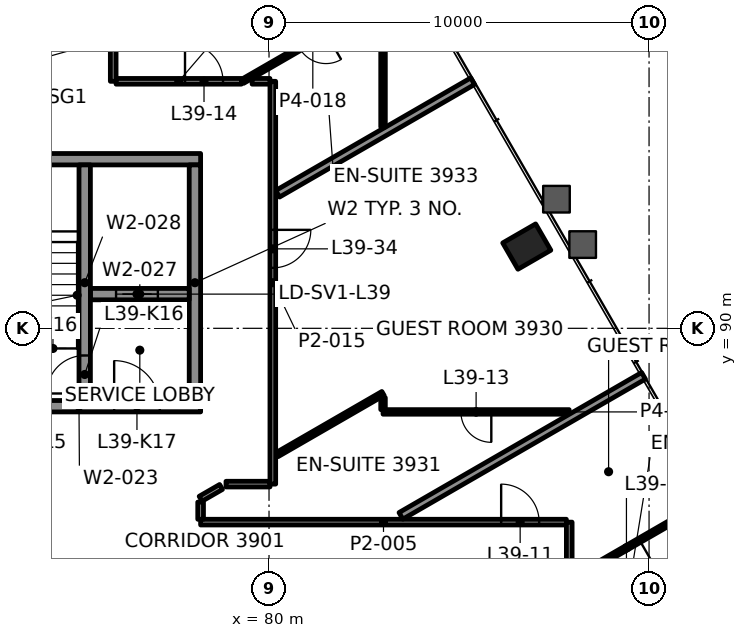
"""IFC4 building model, lengths in metres.
Left out: names, types, materials, properties, quantities, classifications, styles, units other than length and angle.
Written with IfcOpenShell. Run it as: python <this file> out.ifc"""

import sys

from ifc_helpers import new_model, si_unit, direction, frame, frame_2d, origin, origin_2d, place, context, subcontext, project, spatial, rectangle, hollow_rectangle, extrude, element, fill, save


model = new_model("IFC4")
c1 = context("Model", 3, precision=1e-05, world=origin(), true_north=direction((0.0, 1.0)))
c2 = subcontext(c1, "Body", "Model", "MODEL_VIEW")
j1 = project(units=[si_unit("LENGTHUNIT", "METRE"), si_unit("PLANEANGLEUNIT", "RADIAN")], contexts=[c1])
p1 = place(None, origin())
s1 = spatial("IfcSite", under=j1, at=p1, CompositionType="ELEMENT")
p2 = place(p1, origin())
s2 = spatial("IfcBuilding", under=s1, at=p2, CompositionType="ELEMENT")
p3 = place(p2, frame((0.0, 0.0, 171.4)))
s3 = spatial("IfcBuildingStorey", under=s2, at=p3, CompositionType="ELEMENT", Elevation=171.4)
p4 = place(p3, frame((86.782, 92.151, -0.0), z_axis=(0.0, 0.0, 1.0), x_axis=(-0.5, 0.866025403784, 0.0)))
e1 = element("IfcColumn", 1, at=p4, inside=s3, PredefinedType="COLUMN", context=c2, shape_type="SweptSolid", body=[
    extrude(hollow_rectangle(XDim=0.8, YDim=1.0, WallThickness=0.05, at=origin_2d()), origin(), (0.0, 0.0, 1.0), 3.9),
])
p5 = place(p3, frame((71.8, 87.95, 0.0), z_axis=(0.0, 0.0, 1.0), x_axis=(1.0, 0.0, 0.0)))
e2 = element("IfcWall", 2, at=p5, inside=s3, PredefinedType="SHEAR", context=c2, shape_type="SweptSolid", body=[
    extrude(rectangle(XDim=6.4, YDim=0.3, at=frame_2d((3.2, 0.0))), origin(), (0.0, 0.0, 1.0), 3.7),
])
p6 = place(p5, frame((1.325, 0.0, 0.0)))
e3 = element("IfcOpeningElement", 3, at=p6, cuts=e2, PredefinedType="OPENING", context=c2, shape_type="SweptSolid", body=[
    extrude(rectangle(XDim=1.0, YDim=2.1, at=frame_2d((0.5, 1.05))), frame((0.0, 0.16, 0.0), z_axis=(0.0, -1.0, 0.0), x_axis=(1.0, 0.0, 0.0)), (0.0, 0.0, 1.0), 0.32),
])
p7 = place(p5, frame((4.125, 0.0, 0.0)))
e4 = element("IfcOpeningElement", 4, at=p7, cuts=e2, PredefinedType="OPENING", context=c2, shape_type="SweptSolid", body=[
    extrude(rectangle(XDim=1.2, YDim=2.1, at=frame_2d((0.6, 1.05))), frame((0.0, 0.16, 0.0), z_axis=(0.0, -1.0, 0.0), x_axis=(1.0, 0.0, 0.0)), (0.0, 0.0, 1.0), 0.32),
])
p8 = place(p3, frame((71.8, 94.45, 0.0), z_axis=(0.0, 0.0, 1.0), x_axis=(1.0, 0.0, 0.0)))
e5 = element("IfcWall", 5, at=p8, inside=s3, PredefinedType="SHEAR", context=c2, shape_type="SweptSolid", body=[
    extrude(rectangle(XDim=6.4, YDim=0.3, at=frame_2d((3.2, 0.0))), origin(), (0.0, 0.0, 1.0), 3.7),
])
p9 = place(p3, frame((78.05, 88.1, 0.0), z_axis=(0.0, 0.0, 1.0), x_axis=(0.0, 1.0, 0.0)))
e6 = element("IfcWall", 6, at=p9, inside=s3, PredefinedType="SHEAR", context=c2, shape_type="SweptSolid", body=[
    extrude(rectangle(XDim=6.2, YDim=0.3, at=frame_2d((3.1, 0.0))), origin(), (0.0, 0.0, 1.0), 3.7),
])
p10 = place(p3, frame((75.3, 90.9, 0.0), z_axis=(0.0, 0.0, 1.0), x_axis=(1.0, 0.0, 0.0)))
e7 = element("IfcWall", 7, at=p10, inside=s3, PredefinedType="SHEAR", context=c2, shape_type="SweptSolid", body=[
    extrude(rectangle(XDim=2.6, YDim=0.3, at=frame_2d((1.3, 0.0))), origin(), (0.0, 0.0, 1.0), 3.7),
])
p11 = place(p10, frame((0.675, 0.0, 0.0)))
e8 = element("IfcOpeningElement", 8, at=p11, cuts=e7, PredefinedType="OPENING", context=c2, shape_type="SweptSolid", body=[
    extrude(rectangle(XDim=1.1, YDim=2.1, at=frame_2d((0.55, 1.05))), frame((0.0, 0.16, 0.0), z_axis=(0.0, -1.0, 0.0), x_axis=(1.0, 0.0, 0.0)), (0.0, 0.0, 1.0), 0.32),
])
p12 = place(p3, frame((75.15, 88.1, 0.0), z_axis=(0.0, 0.0, 1.0), x_axis=(0.0, 1.0, 0.0)))
e9 = element("IfcWall", 9, at=p12, inside=s3, PredefinedType="SHEAR", context=c2, shape_type="SweptSolid", body=[
    extrude(rectangle(XDim=6.2, YDim=0.3, at=frame_2d((3.1, 0.0))), origin(), (0.0, 0.0, 1.0), 3.7),
])
p13 = place(p12, frame((0.185, 0.0, 0.0)))
e10 = element("IfcOpeningElement", 10, at=p13, cuts=e9, PredefinedType="OPENING", context=c2, shape_type="SweptSolid", body=[
    extrude(rectangle(XDim=1.0, YDim=2.1, at=frame_2d((0.5, 1.05))), frame((0.0, 0.16, 0.0), z_axis=(0.0, -1.0, 0.0), x_axis=(1.0, 0.0, 0.0)), (0.0, 0.0, 1.0), 0.32),
])
p14 = place(p3, frame((78.2, 84.9, 0.0), z_axis=(0.0, 0.0, 1.0), x_axis=(1.0, 0.0, 0.0)))
e11 = element("IfcWall", 11, at=p14, inside=s3, PredefinedType="PARTITIONING", context=c2, shape_type="SweptSolid", body=[
    extrude(rectangle(XDim=9.625, YDim=0.15, at=frame_2d((4.812, 0.0))), origin(), (0.0, 0.0, 1.0), 3.1),
])
p15 = place(p14, frame((7.908, 0.0, 0.0)))
e12 = element("IfcOpeningElement", 12, at=p15, cuts=e11, PredefinedType="OPENING", context=c2, shape_type="SweptSolid", body=[
    extrude(rectangle(XDim=1.0, YDim=2.1, at=frame_2d((0.5, 1.05))), frame((0.0, 0.085, 0.0), z_axis=(0.0, -1.0, 0.0), x_axis=(1.0, 0.0, 0.0)), (0.0, 0.0, 1.0), 0.17),
])
p16 = place(p3, frame((78.868, 85.9, 0.0), z_axis=(0.0, 0.0, 1.0), x_axis=(1.0, 0.0, 0.0)))
e13 = element("IfcWall", 13, at=p16, inside=s3, PredefinedType="PARTITIONING", context=c2, shape_type="SweptSolid", body=[
    extrude(rectangle(XDim=1.157, YDim=0.15, at=frame_2d((0.578, 0.0))), origin(), (0.0, 0.0, 1.0), 3.1),
])
p17 = place(p3, frame((87.898, 87.8, 0.0), z_axis=(0.0, 0.0, 1.0), x_axis=(-1.0, 0.0, 0.0)))
e14 = element("IfcWall", 14, at=p17, inside=s3, PredefinedType="PARTITIONING", context=c2, shape_type="SweptSolid", body=[
    extrude(rectangle(XDim=4.898, YDim=0.12, at=frame_2d((2.449, 0.0))), origin(), (0.0, 0.0, 1.0), 3.1),
])
p18 = place(p17, frame((2.049, 0.0, 0.0)))
e15 = element("IfcOpeningElement", 15, at=p18, cuts=e14, PredefinedType="OPENING", context=c2, shape_type="SweptSolid", body=[
    extrude(rectangle(XDim=0.8, YDim=2.1, at=frame_2d((0.4, 1.05))), frame((0.0, 0.07, 0.0), z_axis=(0.0, -1.0, 0.0), x_axis=(1.0, 0.0, 0.0)), (0.0, 0.0, 1.0), 0.14),
])
p19 = place(p3, frame((75.975, 96.5, 0.0), z_axis=(0.0, 0.0, 1.0), x_axis=(1.0, 0.0, 0.0)))
e16 = element("IfcWall", 16, at=p19, inside=s3, PredefinedType="PARTITIONING", context=c2, shape_type="SweptSolid", body=[
    extrude(rectangle(XDim=3.299, YDim=0.15, at=frame_2d((1.649, 0.0))), origin(), (0.0, 0.0, 1.0), 3.1),
])
p20 = place(p19, frame((1.814, 0.0, 0.0)))
e17 = element("IfcOpeningElement", 17, at=p20, cuts=e16, PredefinedType="OPENING", context=c2, shape_type="SweptSolid", body=[
    extrude(rectangle(XDim=1.0, YDim=2.1, at=frame_2d((0.5, 1.05))), frame((0.0, 0.085, 0.0), z_axis=(0.0, -1.0, 0.0), x_axis=(1.0, 0.0, 0.0)), (0.0, 0.0, 1.0), 0.17),
])
p21 = place(p3, frame((90.8, 85.028, 0.0), z_axis=(0.0, 0.0, 1.0), x_axis=(-0.866010186656, -0.500026355914, 0.0)))
e18 = element("IfcWall", 18, at=p21, inside=s3, PredefinedType="PARTITIONING", context=c2, shape_type="SweptSolid", body=[
    extrude(rectangle(XDim=3.222, YDim=0.12, at=frame_2d((1.611, 0.0))), origin(), (0.0, 0.0, 1.0), 3.022),
])
p22 = place(p21, frame((1.211, 0.0, 0.0)))
e19 = element("IfcOpeningElement", 19, at=p22, cuts=e18, PredefinedType="OPENING", context=c2, shape_type="SweptSolid", body=[
    extrude(rectangle(XDim=0.8, YDim=2.1, at=frame_2d((0.4, 1.05))), frame((0.0, 0.07, 0.0), z_axis=(0.0, -1.0, 0.0), x_axis=(1.0, 0.0, 0.0)), (0.0, 0.0, 1.0), 0.14),
])
p23 = place(p3, frame((83.471, 85.065, 0.0), z_axis=(0.0, 0.0, 1.0), x_axis=(0.866022862013, 0.500004402451, 0.0)))
e20 = element("IfcWall", 20, at=p23, inside=s3, PredefinedType="PARTITIONING", context=c2, shape_type="SweptSolid", body=[
    extrude(rectangle(XDim=7.371, YDim=0.2, at=frame_2d((3.685, 0.0))), origin(), (0.0, 0.0, 1.0), 3.022),
])
p24 = place(p3, frame((78.2, 85.515, 0.0), z_axis=(0.0, 0.0, 1.0), x_axis=(0.866035156036, 0.499983108224, 0.0)))
e21 = element("IfcWall", 21, at=p24, inside=s3, PredefinedType="PARTITIONING", context=c2, shape_type="SweptSolid", body=[
    extrude(rectangle(XDim=0.622, YDim=0.15, at=frame_2d((0.311, 0.0))), origin(), (0.0, 0.0, 1.0), 3.1),
])
p25 = place(p3, frame((80.209, 86.675, 0.0), z_axis=(0.0, 0.0, 1.0), x_axis=(0.86604299788, 0.499969524894, 0.0)))
e22 = element("IfcWall", 22, at=p25, inside=s3, PredefinedType="PARTITIONING", context=c2, shape_type="SweptSolid", body=[
    extrude(rectangle(XDim=3.222, YDim=0.12, at=frame_2d((1.611, 0.0))), origin(), (0.0, 0.0, 1.0), 3.1),
])
p26 = place(p3, frame((80.227, 93.541, 0.0), z_axis=(0.0, 0.0, 1.0), x_axis=(0.866041507197, 0.499972107033, 0.0)))
e23 = element("IfcWall", 23, at=p26, inside=s3, PredefinedType="PARTITIONING", context=c2, shape_type="SweptSolid", body=[
    extrude(rectangle(XDim=5.926, YDim=0.2, at=frame_2d((2.963, 0.0))), origin(), (0.0, 0.0, 1.0), 3.022),
])
p27 = place(p3, frame((83.0, 98.634, 0.0), z_axis=(0.0, 0.0, 1.0), x_axis=(-0.866013160285, -0.500021205763, 0.0)))
e24 = element("IfcWall", 24, at=p27, inside=s3, PredefinedType="PARTITIONING", context=c2, shape_type="SweptSolid", body=[
    extrude(rectangle(XDim=4.268, YDim=0.12, at=frame_2d((2.134, 0.0))), origin(), (0.0, 0.0, 1.0), 3.022),
])
p28 = place(p27, frame((1.734, 0.0, 0.0)))
e25 = element("IfcOpeningElement", 25, at=p28, cuts=e24, PredefinedType="OPENING", context=c2, shape_type="SweptSolid", body=[
    extrude(rectangle(XDim=0.8, YDim=2.1, at=frame_2d((0.4, 1.05))), frame((0.0, 0.07, 0.0), z_axis=(0.0, -1.0, 0.0), x_axis=(1.0, 0.0, 0.0)), (0.0, 0.0, 1.0), 0.14),
])
p29 = place(p3, frame((87.9, 84.899, 0.0), z_axis=(0.0, 0.0, 1.0), x_axis=(0.0, -1.0, 0.0)))
e26 = element("IfcWall", 26, at=p29, inside=s3, PredefinedType="PARTITIONING", context=c2, shape_type="SweptSolid", body=[
    extrude(rectangle(XDim=16.308, YDim=0.15, at=frame_2d((8.154, 0.0))), origin(), (0.0, 0.0, 1.0), 3.1),
])
p30 = place(p29, frame((5.527, 0.0, 0.0)))
e27 = element("IfcOpeningElement", 27, at=p30, cuts=e26, PredefinedType="OPENING", context=c2, shape_type="SweptSolid", body=[
    extrude(rectangle(XDim=1.0, YDim=2.1, at=frame_2d((0.5, 1.05))), frame((0.0, 0.085, 0.0), z_axis=(0.0, -1.0, 0.0), x_axis=(1.0, 0.0, 0.0)), (0.0, 0.0, 1.0), 0.17),
])
p31 = place(p29, frame((13.074, 0.0, 0.0)))
e28 = element("IfcOpeningElement", 28, at=p31, cuts=e26, PredefinedType="OPENING", context=c2, shape_type="SweptSolid", body=[
    extrude(rectangle(XDim=1.0, YDim=2.1, at=frame_2d((0.5, 1.05))), frame((0.0, 0.085, 0.0), z_axis=(0.0, -1.0, 0.0), x_axis=(1.0, 0.0, 0.0)), (0.0, 0.0, 1.0), 0.17),
])
p32 = place(p3, frame((83.0, 87.86, 0.0), z_axis=(0.0, 0.0, 1.0), x_axis=(0.0, 1.0, 0.0)))
e29 = element("IfcWall", 29, at=p32, inside=s3, PredefinedType="PARTITIONING", context=c2, shape_type="SweptSolid", body=[
    extrude(rectangle(XDim=0.316, YDim=0.12, at=frame_2d((0.158, 0.0))), origin(), (0.0, 0.0, 1.0), 3.1),
])
p33 = place(p3, frame((83.0, 95.297, 0.0), z_axis=(0.0, 0.0, 1.0), x_axis=(0.0, 1.0, 0.0)))
e30 = element("IfcWall", 30, at=p33, inside=s3, PredefinedType="PARTITIONING", context=c2, shape_type="SweptSolid", body=[
    extrude(rectangle(XDim=3.228, YDim=0.12, at=frame_2d((1.614, 0.0))), origin(), (0.0, 0.0, 1.0), 3.022),
])
p34 = place(p3, frame((80.1, 96.5, 0.0), z_axis=(0.0, 0.0, 1.0), x_axis=(0.0, -1.0, 0.0)))
e31 = element("IfcWall", 31, at=p34, inside=s3, PredefinedType="PARTITIONING", context=c2, shape_type="SweptSolid", body=[
    extrude(rectangle(XDim=10.6, YDim=0.15, at=frame_2d((5.3, 0.0))), origin(), (0.0, 0.0, 1.0), 3.022),
])
p35 = place(p34, frame((3.909, 0.0, 0.0)))
e32 = element("IfcOpeningElement", 32, at=p35, cuts=e31, PredefinedType="OPENING", context=c2, shape_type="SweptSolid", body=[
    extrude(rectangle(XDim=1.0, YDim=2.1, at=frame_2d((0.5, 1.05))), frame((0.0, 0.085, 0.0), z_axis=(0.0, -1.0, 0.0), x_axis=(1.0, 0.0, 0.0)), (0.0, 0.0, 1.0), 0.17),
])
p36 = place(p3, frame((78.2, 84.975, 0.0), z_axis=(0.0, 0.0, 1.0), x_axis=(0.0, 1.0, 0.0)))
e33 = element("IfcWall", 33, at=p36, inside=s3, PredefinedType="PARTITIONING", context=c2, shape_type="SweptSolid", body=[
    extrude(rectangle(XDim=0.453, YDim=0.15, at=frame_2d((0.226, 0.0))), origin(), (0.0, 0.0, 1.0), 3.1),
])
p37 = place(p3, frame((75.9, 104.923, 0.0), z_axis=(0.0, 0.0, 1.0), x_axis=(0.0, -1.0, 0.0)))
e34 = element("IfcWall", 34, at=p37, inside=s3, PredefinedType="PARTITIONING", context=c2, shape_type="SweptSolid", body=[
    extrude(rectangle(XDim=8.423, YDim=0.15, at=frame_2d((4.211, 0.0))), origin(), (0.0, 0.0, 1.0), 3.1),
])
p38 = place(p37, frame((0.294, 0.0, 0.0)))
e35 = element("IfcOpeningElement", 35, at=p38, cuts=e34, PredefinedType="OPENING", context=c2, shape_type="SweptSolid", body=[
    extrude(rectangle(XDim=1.0, YDim=2.1, at=frame_2d((0.5, 1.05))), frame((0.0, 0.085, 0.0), z_axis=(0.0, -1.0, 0.0), x_axis=(1.0, 0.0, 0.0)), (0.0, 0.0, 1.0), 0.17),
])
p39 = place(p3, frame((79.555, 96.5, 0.0), z_axis=(0.0, 0.0, 1.0), x_axis=(1.0, 0.0, 0.0)))
e36 = element("IfcWall", 36, at=p39, inside=s3, PredefinedType="PARTITIONING", context=c2, shape_type="SweptSolid", body=[
    extrude(rectangle(XDim=0.47, YDim=0.15, at=frame_2d((0.235, 0.0))), origin(), (0.0, 0.0, 1.0), 3.1),
])
p40 = place(p15, origin())
e37 = element("IfcDoor", 37, at=p40, inside=s3, OperationType="SINGLE_SWING_LEFT", PredefinedType="DOOR", context=c2, shape_type="SweptSolid", body=[
    extrude(rectangle(XDim=1.0, YDim=2.1, at=frame_2d((0.5, 1.05))), frame((0.0, 0.025, 0.0), z_axis=(0.0, -1.0, 0.0), x_axis=(1.0, 0.0, 0.0)), (0.0, 0.0, 1.0), 0.05),
])
fill(e12, e37)
p41 = place(p18, origin())
e38 = element("IfcDoor", 38, at=p41, inside=s3, OperationType="SINGLE_SWING_LEFT", PredefinedType="DOOR", context=c2, shape_type="SweptSolid", body=[
    extrude(rectangle(XDim=0.8, YDim=2.1, at=frame_2d((0.4, 1.05))), frame((0.0, 0.025, 0.0), z_axis=(0.0, -1.0, 0.0), x_axis=(1.0, 0.0, 0.0)), (0.0, 0.0, 1.0), 0.05),
])
fill(e15, e38)
p42 = place(p20, origin())
e39 = element("IfcDoor", 39, at=p42, inside=s3, OperationType="SINGLE_SWING_LEFT", PredefinedType="DOOR", context=c2, shape_type="SweptSolid", body=[
    extrude(rectangle(XDim=1.0, YDim=2.1, at=frame_2d((0.5, 1.05))), frame((0.0, 0.025, 0.0), z_axis=(0.0, -1.0, 0.0), x_axis=(1.0, 0.0, 0.0)), (0.0, 0.0, 1.0), 0.05),
])
fill(e17, e39)
p43 = place(p22, origin())
e40 = element("IfcDoor", 40, at=p43, inside=s3, OperationType="SINGLE_SWING_LEFT", PredefinedType="DOOR", context=c2, shape_type="SweptSolid", body=[
    extrude(rectangle(XDim=0.8, YDim=2.1, at=frame_2d((0.4, 1.05))), frame((0.0, 0.025, 0.0), z_axis=(0.0, -1.0, 0.0), x_axis=(1.0, 0.0, 0.0)), (0.0, 0.0, 1.0), 0.05),
])
fill(e19, e40)
p44 = place(p35, origin())
e41 = element("IfcDoor", 41, at=p44, inside=s3, OperationType="SINGLE_SWING_RIGHT", PredefinedType="DOOR", context=c2, shape_type="SweptSolid", body=[
    extrude(rectangle(XDim=1.0, YDim=2.1, at=frame_2d((0.5, 1.05))), frame((0.0, 0.025, 0.0), z_axis=(0.0, -1.0, 0.0), x_axis=(1.0, 0.0, 0.0)), (0.0, 0.0, 1.0), 0.05),
])
fill(e32, e41)
p45 = place(p3, origin())
p46 = place(p45, frame((86.104, 95.277, 0.15), z_axis=(0.0, 0.0, 1.0), x_axis=(-0.5, 0.866025, 0.0)))
p47 = place(p46, origin())
e42 = element("IfcWindow", 42, at=p47, inside=s3, PartitioningType="SINGLE_PANEL", PredefinedType="WINDOW", context=c2, shape_type="SweptSolid", body=[
    extrude(rectangle(XDim=2.912, YDim=3.55, at=frame_2d((1.456, 1.775))), frame((0.0, 0.03, 0.0), z_axis=(0.0, -1.0, 0.0), x_axis=(1.0, 0.0, 0.0)), (0.0, 0.0, 1.0), 0.06),
])
p48 = place(p11, origin())
e43 = element("IfcDoor", 43, at=p48, inside=s3, OperationType="DOUBLE_DOOR_SLIDING", PredefinedType="DOOR", context=c2, shape_type="SweptSolid", body=[
    extrude(rectangle(XDim=1.1, YDim=2.1, at=frame_2d((0.55, 1.05))), frame((0.0, 0.025, 0.0), z_axis=(0.0, -1.0, 0.0), x_axis=(1.0, 0.0, 0.0)), (0.0, 0.0, 1.0), 0.05),
])
fill(e8, e43)
p49 = place(p13, origin())
e44 = element("IfcDoor", 44, at=p49, inside=s3, OperationType="SINGLE_SWING_LEFT", PredefinedType="DOOR", context=c2, shape_type="SweptSolid", body=[
    extrude(rectangle(XDim=1.0, YDim=2.1, at=frame_2d((0.5, 1.05))), frame((0.0, 0.025, 0.0), z_axis=(0.0, -1.0, 0.0), x_axis=(1.0, 0.0, 0.0)), (0.0, 0.0, 1.0), 0.05),
])
fill(e10, e44)
p50 = place(p7, origin())
e45 = element("IfcDoor", 45, at=p50, inside=s3, OperationType="SINGLE_SWING_RIGHT", PredefinedType="DOOR", context=c2, shape_type="SweptSolid", body=[
    extrude(rectangle(XDim=1.2, YDim=2.1, at=frame_2d((0.6, 1.05))), frame((0.0, 0.025, 0.0), z_axis=(0.0, -1.0, 0.0), x_axis=(1.0, 0.0, 0.0)), (0.0, 0.0, 1.0), 0.05),
])
fill(e4, e45)
save(model, sys.argv[1])
